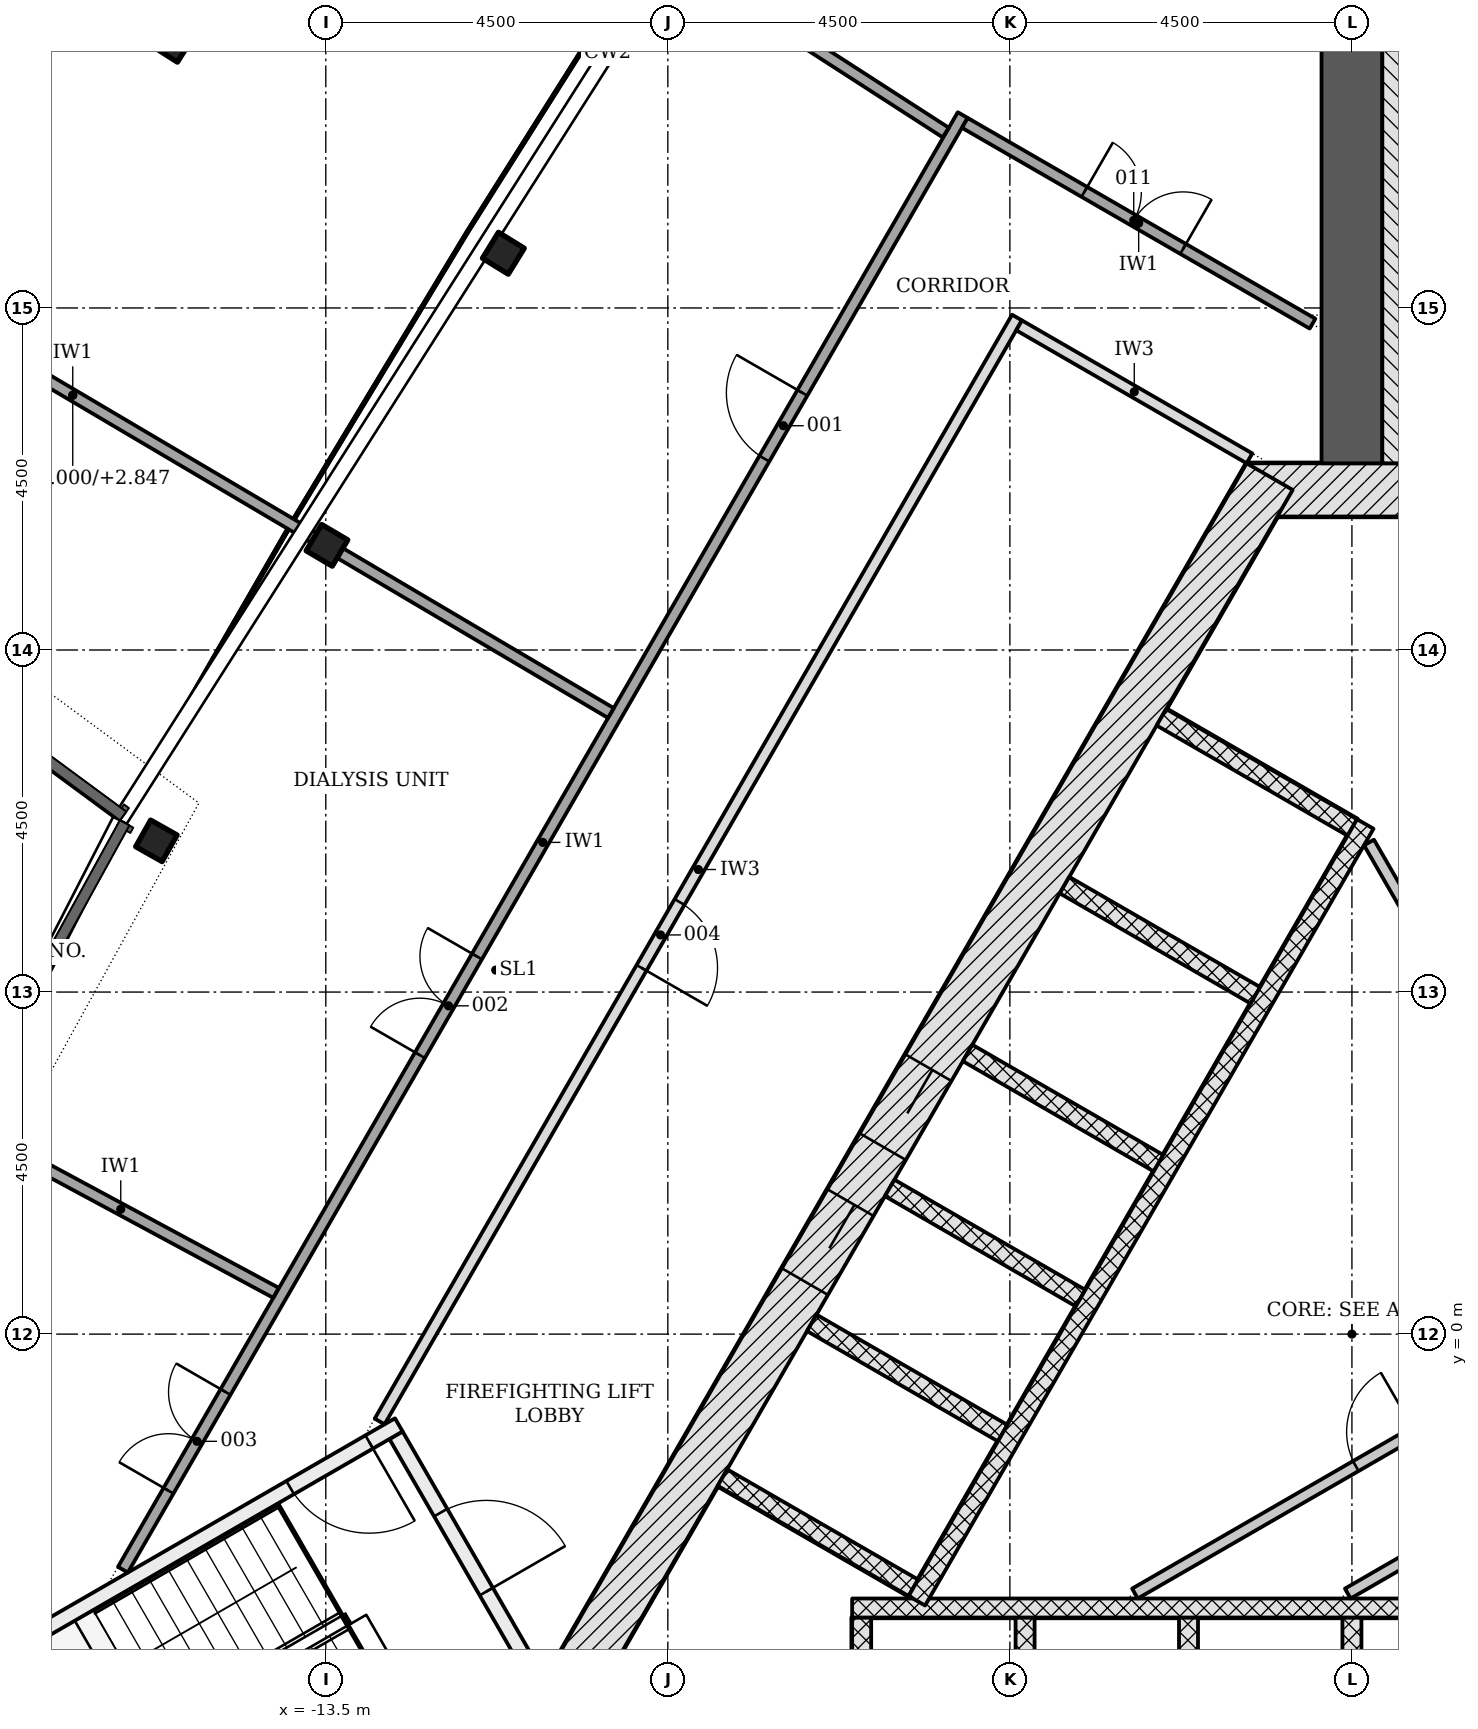
"""IFC4 building model, lengths in metres.
Left out: names, types, materials, properties, quantities, classifications, styles, units other than length and angle.
Written with IfcOpenShell. Run it as: python <this file> out.ifc"""

import sys

from ifc_helpers import new_model, si_unit, direction, frame, frame_2d, origin, origin_2d, place, context, subcontext, project, spatial, polyline, rectangle, hollow_rectangle, i_section, outline, extrude, element, fill, save


model = new_model("IFC4")
c1 = context("Model", 3, precision=1e-05, world=origin(), true_north=direction((0.0, 1.0)))
c2 = subcontext(c1, "Body", "Model", "MODEL_VIEW")
j1 = project(units=[si_unit("LENGTHUNIT", "METRE"), si_unit("PLANEANGLEUNIT", "RADIAN")], contexts=[c1])
p1 = place(None, origin())
s1 = spatial("IfcSite", under=j1, at=p1, CompositionType="ELEMENT")
p2 = place(p1, origin())
s2 = spatial("IfcBuilding", under=s1, at=p2, CompositionType="ELEMENT")
p3 = place(p2, frame((0.0, 0.0, 98.7)))
s3 = spatial("IfcBuildingStorey", under=s2, at=p3, CompositionType="ELEMENT", Elevation=98.7)
p4 = place(p3, frame((1.386, 11.106, -0.2), z_axis=(0.0, 0.0, 1.0), x_axis=(-1.0, 0.0, 0.0)))
e1 = element("IfcWall", 1, at=p4, inside=s3, PredefinedType="SHEAR", context=c2, shape_type="SweptSolid", body=[
    extrude(rectangle(XDim=2.771, YDim=0.7, at=frame_2d((1.386, 0.0))), origin(), (0.0, 0.0, 1.0), 3.6),
])
p5 = place(p3, frame((-1.083, 11.281, -0.2), z_axis=(0.0, 0.0, 1.0), x_axis=(-0.500001446645, -0.866024568562, 0.0)))
e2 = element("IfcWall", 2, at=p5, inside=s3, PredefinedType="SHEAR", context=c2, shape_type="SweptSolid", body=[
    extrude(rectangle(XDim=18.458, YDim=0.7, at=frame_2d((9.229, 0.0))), origin(), (0.0, 0.0, 1.0), 3.6),
])
p6 = place(p5, frame((8.979, 0.0, 0.2)))
e3 = element("IfcOpeningElement", 3, at=p6, cuts=e2, PredefinedType="OPENING", context=c2, shape_type="SweptSolid", body=[
    extrude(rectangle(XDim=1.2, YDim=2.1, at=frame_2d((0.6, 1.05))), frame((0.0, 0.36, 0.0), z_axis=(0.0, -1.0, 0.0), x_axis=(1.0, 0.0, 0.0)), (0.0, 0.0, 1.0), 0.72),
])
p7 = place(p5, frame((11.029, 0.0, 0.2)))
e4 = element("IfcOpeningElement", 4, at=p7, cuts=e2, PredefinedType="OPENING", context=c2, shape_type="SweptSolid", body=[
    extrude(rectangle(XDim=1.2, YDim=2.1, at=frame_2d((0.6, 1.05))), frame((0.0, 0.36, 0.0), z_axis=(0.0, -1.0, 0.0), x_axis=(1.0, 0.0, 0.0)), (0.0, 0.0, 1.0), 0.72),
])
p8 = place(p3, frame((0.0, 11.456, -0.2), z_axis=(0.0, 0.0, 1.0), x_axis=(0.0, 1.0, 0.0)))
e5 = element("IfcWall", 5, at=p8, inside=s3, PredefinedType="SHEAR", context=c2, shape_type="SweptSolid", body=[
    extrude(rectangle(XDim=12.678, YDim=0.8, at=frame_2d((6.339, 0.0))), origin(), (0.0, 0.0, 1.0), 3.6),
])
for number, where, z_axis, x_axis in (
    (6, (-11.164, 14.22, -0.2), (0.0, 0.0, 1.0), (-0.525, -0.851, 0.0)),
    (7, (-13.484, 10.377, -0.2), (0.0, 0.0, 1.0), (-0.508, -0.861, 0.0)),
    (8, (-15.729, 6.49, -0.2), (0.0, 0.0, 1.0), (-0.491, -0.871, 0.0)),
):
    element("IfcColumn", number, at=place(p3, frame(where, z_axis=z_axis, x_axis=x_axis)), inside=s3, PredefinedType="COLUMN", context=c2, shape_type="SweptSolid", body=[
        extrude(i_section(OverallWidth=0.401, OverallDepth=0.399, WebThickness=0.025, FlangeThickness=0.04, FilletRadius=0.015, at=origin_2d()), origin(), (0.0, 0.0, 1.0), 3.6),
    ])
p9 = place(p3, frame((-15.507, 16.98, -0.2), z_axis=(0.0, 0.0, 1.0), x_axis=(-0.843995500683, 0.536350253871, 0.0)))
e9 = element("IfcColumn", 9, at=p9, inside=s3, PredefinedType="COLUMN", context=c2, shape_type="SweptSolid", body=[
    extrude(hollow_rectangle(XDim=0.356, YDim=0.356, WallThickness=0.013, at=origin_2d()), origin(), (0.0, 0.0, 1.0), 3.6),
])
for number, where, z_axis, x_axis in (
    (10, (-6.45, -6.228, -0.2), (0.0, 0.0, 1.0), (0.0, 1.0, 0.0)),
    (11, (-4.3, -6.228, -0.2), (0.0, 0.0, 1.0), (0.0, 1.0, 0.0)),
    (12, (-2.15, -6.228, -0.2), (0.0, 0.0, 1.0), (0.0, 1.0, 0.0)),
    (13, (0.0, -6.228, -0.2), (0.0, 0.0, 1.0), (0.0, 1.0, 0.0)),
):
    element("IfcWall", number, at=place(p3, frame(where, z_axis=z_axis, x_axis=x_axis)), inside=s3, PredefinedType="PARTITIONING", context=c2, shape_type="SweptSolid", body=[
        extrude(rectangle(XDim=2.5, YDim=0.25, at=frame_2d((1.25, 0.0))), origin(), (0.0, 0.0, 1.0), 3.6),
    ])
p10 = place(p3, frame((-6.575, -3.603, 0.0), z_axis=(0.0, 0.0, 1.0), x_axis=(1.0, 0.0, 0.0)))
e14 = element("IfcWall", 14, at=p10, inside=s3, PredefinedType="PARTITIONING", context=c2, shape_type="SweptSolid", body=[
    extrude(rectangle(XDim=13.15, YDim=0.25, at=frame_2d((6.575, 0.0))), origin(), (0.0, 0.0, 1.0), 3.4),
])
p11 = place(p3, frame((-2.506, 8.115, -0.2), z_axis=(0.0, 0.0, 1.0), x_axis=(0.865996321171, -0.50005036918, 0.0)))
e15 = element("IfcWall", 15, at=p11, inside=s3, PredefinedType="PARTITIONING", context=c2, shape_type="SweptSolid", body=[
    extrude(rectangle(XDim=2.9, YDim=0.25, at=frame_2d((1.45, 0.0))), origin(), (0.0, 0.0, 1.0), 3.6),
])
for number, where, z_axis, x_axis in (
    (16, (-3.781, 5.907, -0.2), (0.0, 0.0, 1.0), (0.866, -0.5, 0.0)),
    (17, (-5.056, 3.699, -0.2), (0.0, 0.0, 1.0), (0.866, -0.5, 0.0)),
    (18, (-6.081, 1.923, -0.2), (0.0, 0.0, 1.0), (0.866, -0.5, 0.0)),
    (19, (-7.106, 0.148, -0.2), (0.0, 0.0, 1.0), (0.866, -0.5, 0.0)),
    (20, (-8.281, -1.887, -0.2), (0.0, 0.0, 1.0), (0.866, -0.5, 0.0)),
):
    element("IfcWall", number, at=place(p3, frame(where, z_axis=z_axis, x_axis=x_axis)), inside=s3, PredefinedType="PARTITIONING", context=c2, shape_type="SweptSolid", body=[
        extrude(rectangle(XDim=2.9, YDim=0.25, at=frame_2d((1.45, 0.0))), origin(), (0.0, 0.0, 1.0), 3.6),
    ])
p12 = place(p3, frame((0.176, 6.711, 0.0), z_axis=(0.0, 0.0, 1.0), x_axis=(-0.500004227369, -0.866022963098, 0.0)))
e21 = element("IfcWall", 21, at=p12, inside=s3, PredefinedType="PARTITIONING", context=c2, shape_type="SweptSolid", body=[
    extrude(rectangle(XDim=11.8, YDim=0.25, at=frame_2d((5.9, 0.0))), origin(), (0.0, 0.0, 1.0), 3.4),
])
p13 = place(p3, frame((-2.854, -3.413, 0.0), z_axis=(0.0, 0.0, 1.0), x_axis=(0.866030102318, 0.499991861813, 0.0)))
e22 = element("IfcWall", 22, at=p13, inside=s3, PredefinedType="PARTITIONING", context=c2, shape_type="SweptSolid", body=[
    extrude(rectangle(XDim=10.407, YDim=0.15, at=frame_2d((5.204, 0.0))), origin(), (0.0, 0.0, 1.0), 3.4),
])
p14 = place(p13, frame((3.354, 0.0, 0.0)))
e23 = element("IfcOpeningElement", 23, at=p14, cuts=e22, PredefinedType="OPENING", context=c2, shape_type="SweptSolid", body=[
    extrude(rectangle(XDim=0.9, YDim=2.1, at=frame_2d((0.45, 1.05))), frame((0.0, 0.085, 0.0), z_axis=(0.0, -1.0, 0.0), x_axis=(1.0, 0.0, 0.0)), (0.0, 0.0, 1.0), 0.17),
])
p15 = place(p3, frame((-0.054, -3.413, 0.0), z_axis=(0.0, 0.0, 1.0), x_axis=(0.866026668906, 0.499997808738, 0.0)))
e24 = element("IfcWall", 24, at=p15, inside=s3, PredefinedType="PARTITIONING", context=c2, shape_type="SweptSolid", body=[
    extrude(rectangle(XDim=7.982, YDim=0.15, at=frame_2d((3.991, 0.0))), origin(), (0.0, 0.0, 1.0), 3.4),
])
p16 = place(p15, frame((2.092, 0.0, 0.0)))
e25 = element("IfcOpeningElement", 25, at=p16, cuts=e24, PredefinedType="OPENING", context=c2, shape_type="SweptSolid", body=[
    extrude(rectangle(XDim=1.0, YDim=2.1, at=frame_2d((0.5, 1.05))), frame((0.0, 0.085, 0.0), z_axis=(0.0, -1.0, 0.0), x_axis=(1.0, 0.0, 0.0)), (0.0, 0.0, 1.0), 0.17),
])
p17 = place(p3, frame((3.546, 0.715, 0.0), z_axis=(0.0, 0.0, 1.0), x_axis=(-0.50002895357, 0.866008686788, 0.0)))
e26 = element("IfcWall", 26, at=p17, inside=s3, PredefinedType="PARTITIONING", context=c2, shape_type="SweptSolid", body=[
    extrude(rectangle(XDim=6.642, YDim=0.15, at=frame_2d((3.321, 0.0))), origin(), (0.0, 0.0, 1.0), 3.4),
])
p18 = place(p3, frame((0.993, 11.456, -0.2), z_axis=(0.0, 0.0, 1.0), x_axis=(0.0, 1.0, 0.0)))
e27 = element("IfcWall", 27, at=p18, inside=s3, PredefinedType="SHEAR", context=c2, shape_type="SweptSolid", body=[
    extrude(rectangle(XDim=7.2, YDim=1.186, at=frame_2d((3.6, 0.0))), origin(), (0.0, 0.0, 1.0), 3.6),
])
p19 = place(p3, frame((-12.576, -1.331, -0.2), z_axis=(0.0, 0.0, 1.0), x_axis=(0.499970499736, -0.8660424351, 0.0)))
e28 = element("IfcWall", 28, at=p19, inside=s3, PredefinedType="SHEAR", context=c2, shape_type="SweptSolid", body=[
    extrude(rectangle(XDim=3.55, YDim=0.2, at=frame_2d((1.775, 0.0))), origin(), (0.0, 0.0, 1.0), 3.6),
])
p20 = place(p19, frame((1.175, 0.0, 0.2)))
e29 = element("IfcOpeningElement", 29, at=p20, cuts=e28, PredefinedType="OPENING", context=c2, shape_type="SweptSolid", body=[
    extrude(rectangle(XDim=1.2, YDim=2.1, at=frame_2d((0.6, 1.05))), frame((0.0, 0.11, 0.0), z_axis=(0.0, -1.0, 0.0), x_axis=(1.0, 0.0, 0.0)), (0.0, 0.0, 1.0), 0.22),
])
p21 = place(p3, frame((-12.539, -1.194, -0.2), z_axis=(0.0, 0.0, 1.0), x_axis=(-0.866045472092, -0.499965239061, 0.0)))
e30 = element("IfcWall", 30, at=p21, inside=s3, PredefinedType="SHEAR", context=c2, shape_type="SweptSolid", body=[
    extrude(rectangle(XDim=5.6, YDim=0.2, at=frame_2d((2.8, 0.0))), origin(), (0.0, 0.0, 1.0), 3.6),
])
p22 = place(p21, frame((0.45, 0.0, 0.2)))
e31 = element("IfcOpeningElement", 31, at=p22, cuts=e30, PredefinedType="OPENING", context=c2, shape_type="SweptSolid", body=[
    extrude(rectangle(XDim=1.2, YDim=2.1, at=frame_2d((0.6, 1.05))), frame((0.0, 0.11, 0.0), z_axis=(0.0, -1.0, 0.0), x_axis=(1.0, 0.0, 0.0)), (0.0, 0.0, 1.0), 0.22),
])
p23 = place(p3, frame((0.0, 0.0, -0.2)))
e32 = element("IfcWall", 32, at=p23, inside=s3, PredefinedType="SHEAR", context=c2, shape_type="SweptSolid", body=[
    extrude(outline(polyline([(-17.439, -3.907), (-18.025, -6.093), (-16.95, -7.955), (-16.777, -7.855), (-17.81, -6.065), (-17.267, -4.039), (-17.339, -4.081), (-17.339, -4.081), (-17.339, -4.081), (-17.339, -4.081), (-17.339, -4.081), (-17.339, -4.081), (-17.339, -4.081), (-17.339, -4.081), (-17.339, -4.081), (-17.339, -4.081), (-17.339, -4.081), (-17.339, -4.081), (-17.339, -4.081), (-17.339, -4.081), (-17.339, -4.081), (-17.339, -4.081), (-17.339, -4.081), (-17.439, -3.907)])), origin(), (0.0, 0.0, 1.0), 3.6),
])
p24 = place(p3, frame((-16.169, -3.099, 0.0), z_axis=(0.0, 0.0, 1.0), x_axis=(0.499999805269, 0.866025516212, 0.0)))
e33 = element("IfcWall", 33, at=p24, inside=s3, PredefinedType="PARTITIONING", context=c2, shape_type="SweptSolid", body=[
    extrude(rectangle(XDim=22.097, YDim=0.15, at=frame_2d((11.049, 0.0))), origin(), (0.0, 0.0, 1.0), 2.778),
])
p25 = place(p24, frame((16.878, 0.0, 0.0)))
e34 = element("IfcOpeningElement", 34, at=p25, cuts=e33, PredefinedType="OPENING", context=c2, shape_type="SweptSolid", body=[
    extrude(rectangle(XDim=1.0, YDim=2.1, at=frame_2d((0.5, 1.05))), frame((0.0, 0.085, 0.0), z_axis=(0.0, -1.0, 0.0), x_axis=(1.0, 0.0, 0.0)), (0.0, 0.0, 1.0), 0.17),
])
p26 = place(p24, frame((7.816, 0.0, 0.0)))
e35 = element("IfcOpeningElement", 35, at=p26, cuts=e33, PredefinedType="OPENING", context=c2, shape_type="SweptSolid", body=[
    extrude(rectangle(XDim=1.5, YDim=2.1, at=frame_2d((0.75, 1.05))), frame((0.0, 0.085, 0.0), z_axis=(0.0, -1.0, 0.0), x_axis=(1.0, 0.0, 0.0)), (0.0, 0.0, 1.0), 0.17),
])
p27 = place(p24, frame((1.2, 0.0, 0.0)))
e36 = element("IfcOpeningElement", 36, at=p27, cuts=e33, PredefinedType="OPENING", context=c2, shape_type="SweptSolid", body=[
    extrude(rectangle(XDim=1.5, YDim=2.1, at=frame_2d((0.75, 1.05))), frame((0.0, 0.085, 0.0), z_axis=(0.0, -1.0, 0.0), x_axis=(1.0, 0.0, 0.0)), (0.0, 0.0, 1.0), 0.17),
])
p28 = place(p3, frame((-4.407, 13.374, 0.0), z_axis=(0.0, 0.0, 1.0), x_axis=(-0.499997181693, -0.866027030928, 0.0)))
e37 = element("IfcWall", 37, at=p28, inside=s3, PredefinedType="PARTITIONING", context=c2, shape_type="SweptSolid", body=[
    extrude(rectangle(XDim=16.77, YDim=0.15, at=frame_2d((8.385, 0.0))), origin(), (0.0, 0.0, 1.0), 2.778),
])
p29 = place(p28, frame((8.879, 0.0, 0.0)))
e38 = element("IfcOpeningElement", 38, at=p29, cuts=e37, PredefinedType="OPENING", context=c2, shape_type="SweptSolid", body=[
    extrude(rectangle(XDim=1.0, YDim=2.1, at=frame_2d((0.5, 1.05))), frame((0.0, 0.085, 0.0), z_axis=(0.0, -1.0, 0.0), x_axis=(1.0, 0.0, 0.0)), (0.0, 0.0, 1.0), 0.17),
])
p30 = place(p3, frame((-5.093, 15.935, 0.0), z_axis=(0.0, 0.0, 1.0), x_axis=(0.866033195618, -0.499986503906, 0.0)))
e39 = element("IfcWall", 39, at=p30, inside=s3, PredefinedType="PARTITIONING", context=c2, shape_type="SweptSolid", body=[
    extrude(rectangle(XDim=5.282, YDim=0.15, at=frame_2d((2.641, 0.0))), origin(), (0.0, 0.0, 1.0), 3.4),
])
p31 = place(p30, frame((1.816, 0.0, 0.0)))
e40 = element("IfcOpeningElement", 40, at=p31, cuts=e39, PredefinedType="OPENING", context=c2, shape_type="SweptSolid", body=[
    extrude(rectangle(XDim=1.5, YDim=2.1, at=frame_2d((0.75, 1.05))), frame((0.0, 0.085, 0.0), z_axis=(0.0, -1.0, 0.0), x_axis=(1.0, 0.0, 0.0)), (0.0, 0.0, 1.0), 0.17),
])
p32 = place(p3, frame((-4.379, 13.271, 0.0), z_axis=(0.0, 0.0, 1.0), x_axis=(0.866019471182, -0.500010275428, 0.0)))
e41 = element("IfcWall", 41, at=p32, inside=s3, PredefinedType="PARTITIONING", context=c2, shape_type="SweptSolid", body=[
    extrude(rectangle(XDim=3.5, YDim=0.15, at=frame_2d((1.75, 0.0))), origin(), (0.0, 0.0, 1.0), 3.4),
])
p33 = place(p3, frame((-22.11, 26.621, 0.0), z_axis=(0.0, 0.0, 1.0), x_axis=(0.840382773847, -0.541993351823, 0.0)))
e42 = element("IfcWall", 42, at=p33, inside=s3, PredefinedType="PARTITIONING", context=c2, shape_type="SweptSolid", body=[
    extrude(rectangle(XDim=19.951, YDim=0.15, at=frame_2d((9.976, 0.0))), origin(), (0.0, 0.0, 1.0), 2.778),
])
p34 = place(p3, frame((-23.909, 16.533, 0.0), z_axis=(0.0, 0.0, 1.0), x_axis=(0.86106275482, -0.508498704288, 0.0)))
e43 = element("IfcWall", 43, at=p34, inside=s3, PredefinedType="PARTITIONING", context=c2, shape_type="SweptSolid", body=[
    extrude(rectangle(XDim=16.444, YDim=0.15, at=frame_2d((8.222, 0.0))), origin(), (0.0, 0.0, 1.0), 2.778),
])
p35 = place(p3, frame((-18.24, 2.743, 0.0), z_axis=(0.0, 0.0, 1.0), x_axis=(0.88042716359, -0.474181410024, 0.0)))
e44 = element("IfcWall", 44, at=p35, inside=s3, PredefinedType="PARTITIONING", context=c2, shape_type="SweptSolid", body=[
    extrude(rectangle(XDim=4.639, YDim=0.15, at=frame_2d((2.32, 0.0))), origin(), (0.0, 0.0, 1.0), 2.778),
])
p36 = place(p6, origin())
e45 = element("IfcDoor", 45, at=p36, inside=s3, OperationType="DOUBLE_DOOR_SLIDING", PredefinedType="DOOR", context=c2, shape_type="SweptSolid", body=[
    extrude(rectangle(XDim=1.2, YDim=2.1, at=frame_2d((0.6, 1.05))), frame((0.0, 0.025, 0.0), z_axis=(0.0, -1.0, 0.0), x_axis=(1.0, 0.0, 0.0)), (0.0, 0.0, 1.0), 0.05),
])
fill(e3, e45)
p37 = place(p7, origin())
e46 = element("IfcDoor", 46, at=p37, inside=s3, OperationType="DOUBLE_DOOR_SLIDING", PredefinedType="DOOR", context=c2, shape_type="SweptSolid", body=[
    extrude(rectangle(XDim=1.2, YDim=2.1, at=frame_2d((0.6, 1.05))), frame((0.0, 0.025, 0.0), z_axis=(0.0, -1.0, 0.0), x_axis=(1.0, 0.0, 0.0)), (0.0, 0.0, 1.0), 0.05),
])
fill(e4, e46)
p38 = place(p14, origin())
e47 = element("IfcDoor", 47, at=p38, inside=s3, OperationType="SINGLE_SWING_RIGHT", PredefinedType="DOOR", context=c2, shape_type="SweptSolid", body=[
    extrude(rectangle(XDim=0.9, YDim=2.1, at=frame_2d((0.45, 1.05))), frame((0.0, 0.025, 0.0), z_axis=(0.0, -1.0, 0.0), x_axis=(1.0, 0.0, 0.0)), (0.0, 0.0, 1.0), 0.05),
])
fill(e23, e47)
p39 = place(p20, origin())
e48 = element("IfcDoor", 48, at=p39, inside=s3, OperationType="SINGLE_SWING_RIGHT", PredefinedType="DOOR", context=c2, shape_type="SweptSolid", body=[
    extrude(rectangle(XDim=1.2, YDim=2.1, at=frame_2d((0.6, 1.05))), frame((0.0, 0.025, 0.0), z_axis=(0.0, -1.0, 0.0), x_axis=(1.0, 0.0, 0.0)), (0.0, 0.0, 1.0), 0.05),
])
fill(e29, e48)
p40 = place(p22, origin())
e49 = element("IfcDoor", 49, at=p40, inside=s3, OperationType="SINGLE_SWING_LEFT", PredefinedType="DOOR", context=c2, shape_type="SweptSolid", body=[
    extrude(rectangle(XDim=1.2, YDim=2.1, at=frame_2d((0.6, 1.05))), frame((0.0, 0.025, 0.0), z_axis=(0.0, -1.0, 0.0), x_axis=(1.0, 0.0, 0.0)), (0.0, 0.0, 1.0), 0.05),
])
fill(e31, e49)
p41 = place(p25, origin())
e50 = element("IfcDoor", 50, at=p41, inside=s3, OperationType="SINGLE_SWING_RIGHT", PredefinedType="DOOR", context=c2, shape_type="SweptSolid", body=[
    extrude(rectangle(XDim=1.0, YDim=2.1, at=frame_2d((0.5, 1.05))), frame((0.0, 0.025, 0.0), z_axis=(0.0, -1.0, 0.0), x_axis=(1.0, 0.0, 0.0)), (0.0, 0.0, 1.0), 0.05),
])
fill(e34, e50)
p42 = place(p26, origin())
e51 = element("IfcDoor", 51, at=p42, inside=s3, OperationType="DOUBLE_DOOR_SINGLE_SWING", PredefinedType="DOOR", context=c2, shape_type="SweptSolid", body=[
    extrude(rectangle(XDim=1.5, YDim=2.1, at=frame_2d((0.75, 1.05))), frame((0.0, 0.025, 0.0), z_axis=(0.0, -1.0, 0.0), x_axis=(1.0, 0.0, 0.0)), (0.0, 0.0, 1.0), 0.05),
])
fill(e35, e51)
p43 = place(p27, origin())
e52 = element("IfcDoor", 52, at=p43, inside=s3, OperationType="DOUBLE_DOOR_SINGLE_SWING", PredefinedType="DOOR", context=c2, shape_type="SweptSolid", body=[
    extrude(rectangle(XDim=1.5, YDim=2.1, at=frame_2d((0.75, 1.05))), frame((0.0, 0.025, 0.0), z_axis=(0.0, -1.0, 0.0), x_axis=(1.0, 0.0, 0.0)), (0.0, 0.0, 1.0), 0.05),
])
fill(e36, e52)
p44 = place(p29, origin())
e53 = element("IfcDoor", 53, at=p44, inside=s3, OperationType="SINGLE_SWING_RIGHT", PredefinedType="DOOR", context=c2, shape_type="SweptSolid", body=[
    extrude(rectangle(XDim=1.0, YDim=2.1, at=frame_2d((0.5, 1.05))), frame((0.0, 0.025, 0.0), z_axis=(0.0, -1.0, 0.0), x_axis=(1.0, 0.0, 0.0)), (0.0, 0.0, 1.0), 0.05),
])
fill(e38, e53)
p45 = place(p31, origin())
e54 = element("IfcDoor", 54, at=p45, inside=s3, OperationType="DOUBLE_DOOR_SINGLE_SWING", PredefinedType="DOOR", context=c2, shape_type="SweptSolid", body=[
    extrude(rectangle(XDim=1.5, YDim=2.1, at=frame_2d((0.75, 1.05))), frame((0.0, 0.025, 0.0), z_axis=(0.0, -1.0, 0.0), x_axis=(1.0, 0.0, 0.0)), (0.0, 0.0, 1.0), 0.05),
])
fill(e40, e54)
save(model, sys.argv[1])
